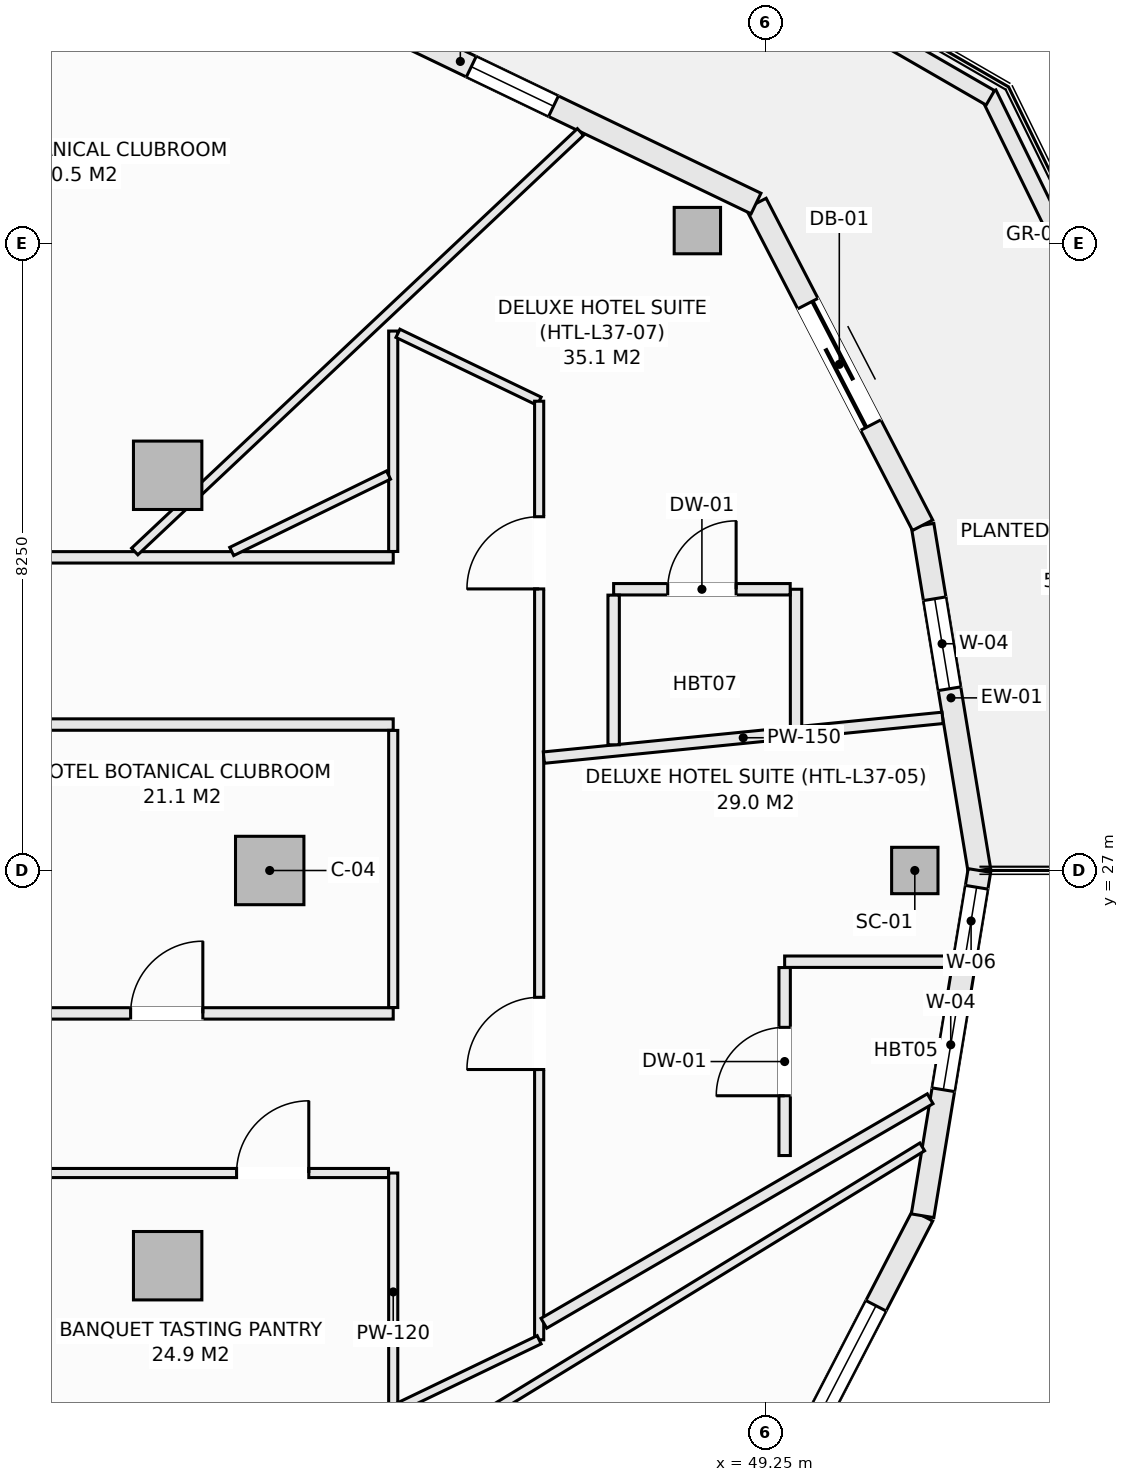
"""IFC4 building model, lengths in metres.
Left out: names, types, materials, properties, quantities, classifications, styles, units other than length and angle.
Written with IfcOpenShell. Run it as: python <this file> out.ifc"""

import sys

from ifc_helpers import new_model, si_unit, direction, frame, frame_2d, origin, origin_2d, place, context, subcontext, project, spatial, rectangle, hollow_rectangle, extrude, element, fill, save


model = new_model("IFC4")
c1 = context("Model", 3, precision=1e-05, world=origin(), true_north=direction((0.0, 1.0)))
c2 = subcontext(c1, "Body", "Model", "MODEL_VIEW")
j1 = project(units=[si_unit("LENGTHUNIT", "METRE"), si_unit("PLANEANGLEUNIT", "RADIAN")], contexts=[c1])
p1 = place(None, origin())
s1 = spatial("IfcSite", under=j1, at=p1, CompositionType="ELEMENT")
p2 = place(p1, origin())
s2 = spatial("IfcBuilding", under=s1, at=p2, CompositionType="ELEMENT")
p3 = place(p2, frame((0.0, 0.0, 146.1)))
s3 = spatial("IfcBuildingStorey", under=s2, at=p3, CompositionType="ELEMENT", Elevation=146.1)
for number, where, z_axis, x_axis in (
    (1, (51.212, 27.0, -0.27), (0.0, 0.0, 1.0), (1.0, 0.0, 0.0)),
    (2, (48.352, 35.419, -0.27), (0.0, 0.0, 1.0), (1.0, 0.0, 0.0)),
):
    element("IfcColumn", number, at=place(p3, frame(where, z_axis=z_axis, x_axis=x_axis)), inside=s3, PredefinedType="COLUMN", context=c2, shape_type="SweptSolid", body=[
        extrude(hollow_rectangle(XDim=0.61, YDim=0.61, WallThickness=0.025, at=origin_2d()), origin(), (0.0, 0.0, 1.0), 3.4),
    ])
for number, where, z_axis, x_axis in (
    (3, (42.725, 27.0, -0.27), (0.0, 0.0, 1.0), (1.0, 0.0, 0.0)),
    (4, (41.382, 32.199, -0.27), (0.0, 0.0, 1.0), (1.0, 0.0, 0.0)),
    (5, (41.382, 21.801, -0.27), (0.0, 0.0, 1.0), (1.0, 0.0, 0.0)),
):
    element("IfcColumn", number, at=place(p3, frame(where, z_axis=z_axis, x_axis=x_axis)), inside=s3, PredefinedType="COLUMN", context=c2, shape_type="SweptSolid", body=[
        extrude(rectangle(XDim=0.9, YDim=0.9, at=origin_2d()), origin(), (0.0, 0.0, 1.0), 3.4),
    ])
p4 = place(p3, frame((51.315, 31.542, 0.0), z_axis=(0.0, 0.0, 1.0), x_axis=(0.162394765401, -0.986725868806, 0.0)))
e6 = element("IfcWall", 6, at=p4, inside=s3, PredefinedType="SOLIDWALL", context=c2, shape_type="SweptSolid", body=[
    extrude(rectangle(XDim=4.603, YDim=0.3, at=frame_2d((2.302, 0.0))), origin(), (0.0, 0.0, 1.0), 2.653),
])
p5 = place(p4, frame((0.98, 0.0, 0.72)))
e7 = element("IfcOpeningElement", 7, at=p5, cuts=e6, PredefinedType="OPENING", context=c2, shape_type="SweptSolid", body=[
    extrude(rectangle(XDim=1.2, YDim=1.65, at=frame_2d((0.6, 0.825))), frame((0.0, 0.16, 0.0), z_axis=(0.0, -1.0, 0.0), x_axis=(1.0, 0.0, 0.0)), (0.0, 0.0, 1.0), 0.32),
])
p6 = place(p3, frame((49.123, 35.775, 0.0), z_axis=(0.0, 0.0, 1.0), x_axis=(0.459810251451, -0.888017191647, 0.0)))
e8 = element("IfcWall", 8, at=p6, inside=s3, PredefinedType="SOLIDWALL", context=c2, shape_type="SweptSolid", body=[
    extrude(rectangle(XDim=4.766, YDim=0.3, at=frame_2d((2.383, 0.0))), origin(), (0.0, 0.0, 1.0), 2.653),
])
p7 = place(p6, frame((1.483, 0.0, 0.0)))
e9 = element("IfcOpeningElement", 9, at=p7, cuts=e8, PredefinedType="OPENING", context=c2, shape_type="SweptSolid", body=[
    extrude(rectangle(XDim=1.8, YDim=2.25, at=frame_2d((0.9, 1.125))), frame((0.0, 0.16, 0.0), z_axis=(0.0, -1.0, 0.0), x_axis=(1.0, 0.0, 0.0)), (0.0, 0.0, 1.0), 0.32),
])
p8 = place(p3, frame((44.313, 38.086, 0.0), z_axis=(0.0, 0.0, 1.0), x_axis=(0.901353070301, -0.433085029363, 0.0)))
e10 = element("IfcWall", 10, at=p8, inside=s3, PredefinedType="SOLIDWALL", context=c2, shape_type="SweptSolid", body=[
    extrude(rectangle(XDim=5.336, YDim=0.3, at=frame_2d((2.668, 0.0))), origin(), (0.0, 0.0, 1.0), 2.653),
])
p9 = place(p8, frame((1.18, 0.0, 0.72)))
e11 = element("IfcOpeningElement", 11, at=p9, cuts=e10, PredefinedType="OPENING", context=c2, shape_type="SweptSolid", body=[
    extrude(rectangle(XDim=1.2, YDim=1.65, at=frame_2d((0.6, 0.825))), frame((0.0, 0.16, 0.0), z_axis=(0.0, -1.0, 0.0), x_axis=(1.0, 0.0, 0.0)), (0.0, 0.0, 1.0), 0.32),
])
p10 = place(p3, frame((49.123, 18.225, 0.0), z_axis=(0.0, 0.0, 1.0), x_axis=(0.459810251451, 0.888017191647, 0.0)))
e12 = element("IfcWall", 12, at=p10, inside=s3, PredefinedType="SOLIDWALL", context=c2, shape_type="SweptSolid", body=[
    extrude(rectangle(XDim=4.766, YDim=0.3, at=frame_2d((2.383, 0.0))), origin(), (0.0, 0.0, 1.0), 2.653),
])
p11 = place(p10, frame((1.333, 0.0, 0.74)))
e13 = element("IfcOpeningElement", 13, at=p11, cuts=e12, PredefinedType="OPENING", context=c2, shape_type="SweptSolid", body=[
    extrude(rectangle(XDim=2.1, YDim=1.7, at=frame_2d((1.05, 0.85))), frame((0.0, 0.16, 0.0), z_axis=(0.0, -1.0, 0.0), x_axis=(1.0, 0.0, 0.0)), (0.0, 0.0, 1.0), 0.32),
])
p12 = place(p3, frame((51.315, 22.458, 0.0), z_axis=(0.0, 0.0, 1.0), x_axis=(0.162394765401, 0.986725868806, 0.0)))
e14 = element("IfcWall", 14, at=p12, inside=s3, PredefinedType="SOLIDWALL", context=c2, shape_type="SweptSolid", body=[
    extrude(rectangle(XDim=4.603, YDim=0.3, at=frame_2d((2.302, 0.0))), origin(), (0.0, 0.0, 1.0), 2.653),
])
p13 = place(p12, frame((1.68, 0.0, 0.74)))
e15 = element("IfcOpeningElement", 15, at=p13, cuts=e14, PredefinedType="OPENING", context=c2, shape_type="SweptSolid", body=[
    extrude(rectangle(XDim=1.2, YDim=1.7, at=frame_2d((0.6, 0.85))), frame((0.0, 0.16, 0.0), z_axis=(0.0, -1.0, 0.0), x_axis=(1.0, 0.0, 0.0)), (0.0, 0.0, 1.0), 0.32),
])
p14 = place(p12, frame((3.48, 0.0, 0.72)))
e16 = element("IfcOpeningElement", 16, at=p14, cuts=e14, PredefinedType="OPENING", context=c2, shape_type="SweptSolid", body=[
    extrude(rectangle(XDim=0.9, YDim=1.65, at=frame_2d((0.45, 0.825))), frame((0.0, 0.16, 0.0), z_axis=(0.0, -1.0, 0.0), x_axis=(1.0, 0.0, 0.0)), (0.0, 0.0, 1.0), 0.32),
])
p15 = place(p3, frame((52.18, 37.221, 0.0), z_axis=(0.0, 0.0, 1.0), x_axis=(0.439637174641, -0.898175458735, 0.0)))
e17 = element("IfcWall", 17, at=p15, inside=s3, PredefinedType="PARAPET", context=c2, shape_type="SweptSolid", body=[
    extrude(rectangle(XDim=5.567, YDim=0.22, at=frame_2d((2.784, 0.0))), origin(), (0.0, 0.0, 1.0), 0.52),
])
p16 = place(p3, frame((46.958, 40.195, 0.0), z_axis=(0.0, 0.0, 1.0), x_axis=(0.866058128659, -0.499943314571, 0.0)))
e18 = element("IfcWall", 18, at=p16, inside=s3, PredefinedType="PARAPET", context=c2, shape_type="SweptSolid", body=[
    extrude(rectangle(XDim=6.06, YDim=0.22, at=frame_2d((3.03, 0.0))), origin(), (0.0, 0.0, 1.0), 0.52),
])
p17 = place(p3, frame((29.78, 25.12, 0.0), z_axis=(0.0, 0.0, 1.0), x_axis=(1.0, 0.0, 0.0)))
e19 = element("IfcWall", 19, at=p17, inside=s3, PredefinedType="PARTITIONING", context=c2, shape_type="SweptSolid", body=[
    extrude(rectangle(XDim=14.57, YDim=0.15, at=frame_2d((7.285, 0.0))), origin(), (0.0, 0.0, 1.0), 3.13),
])
p18 = place(p17, frame((3.14, 0.0, 0.0)))
e20 = element("IfcOpeningElement", 20, at=p18, cuts=e19, PredefinedType="OPENING", context=c2, shape_type="SweptSolid", body=[
    extrude(rectangle(XDim=0.95, YDim=2.1, at=frame_2d((0.475, 1.05))), frame((0.0, 0.085, 0.0), z_axis=(0.0, -1.0, 0.0), x_axis=(1.0, 0.0, 0.0)), (0.0, 0.0, 1.0), 0.17),
])
p19 = place(p17, frame((7.445, 0.0, 0.0)))
e21 = element("IfcOpeningElement", 21, at=p19, cuts=e19, PredefinedType="OPENING", context=c2, shape_type="SweptSolid", body=[
    extrude(rectangle(XDim=0.95, YDim=2.1, at=frame_2d((0.475, 1.05))), frame((0.0, 0.085, 0.0), z_axis=(0.0, -1.0, 0.0), x_axis=(1.0, 0.0, 0.0)), (0.0, 0.0, 1.0), 0.17),
])
p20 = place(p17, frame((11.115, 0.0, 0.0)))
e22 = element("IfcOpeningElement", 22, at=p20, cuts=e19, PredefinedType="OPENING", context=c2, shape_type="SweptSolid", body=[
    extrude(rectangle(XDim=0.95, YDim=2.1, at=frame_2d((0.475, 1.05))), frame((0.0, 0.085, 0.0), z_axis=(0.0, -1.0, 0.0), x_axis=(1.0, 0.0, 0.0)), (0.0, 0.0, 1.0), 0.17),
])
p21 = place(p3, frame((30.077, 28.92, 0.0), z_axis=(0.0, 0.0, 1.0), x_axis=(1.0, 0.0, 0.0)))
e23 = element("IfcWall", 23, at=p21, inside=s3, PredefinedType="PARTITIONING", context=c2, shape_type="SweptSolid", body=[
    extrude(rectangle(XDim=14.273, YDim=0.15, at=frame_2d((7.137, 0.0))), origin(), (0.0, 0.0, 1.0), 3.13),
])
p22 = place(p3, frame((38.862, 31.12, 0.0), z_axis=(0.0, 0.0, 1.0), x_axis=(1.0, 0.0, 0.0)))
e24 = element("IfcWall", 24, at=p22, inside=s3, PredefinedType="PARTITIONING", context=c2, shape_type="SweptSolid", body=[
    extrude(rectangle(XDim=5.488, YDim=0.15, at=frame_2d((2.744, 0.0))), origin(), (0.0, 0.0, 1.0), 3.13),
])
p23 = place(p3, frame((44.35, 19.891, 0.0), z_axis=(0.0, 0.0, 1.0), x_axis=(0.0, 1.0, 0.0)))
e25 = element("IfcWall", 25, at=p23, inside=s3, PredefinedType="PARTITIONING", context=c2, shape_type="SweptSolid", body=[
    extrude(rectangle(XDim=3.129, YDim=0.12, at=frame_2d((1.564, 0.0))), origin(), (0.0, 0.0, 1.0), 3.13),
])
p24 = place(p3, frame((44.35, 25.197, 0.0), z_axis=(0.0, 0.0, 1.0), x_axis=(0.0, 1.0, 0.0)))
e26 = element("IfcWall", 26, at=p24, inside=s3, PredefinedType="PARTITIONING", context=c2, shape_type="SweptSolid", body=[
    extrude(rectangle(XDim=3.646, YDim=0.12, at=frame_2d((1.823, 0.0))), origin(), (0.0, 0.0, 1.0), 3.13),
])
p25 = place(p3, frame((44.35, 31.197, 0.0), z_axis=(0.0, 0.0, 1.0), x_axis=(0.0, 1.0, 0.0)))
e27 = element("IfcWall", 27, at=p25, inside=s3, PredefinedType="PARTITIONING", context=c2, shape_type="SweptSolid", body=[
    extrude(rectangle(XDim=2.9, YDim=0.12, at=frame_2d((1.45, 0.0))), origin(), (0.0, 0.0, 1.0), 3.13),
])
p26 = place(p3, frame((44.412, 34.067, 0.0), z_axis=(0.0, 0.0, 1.0), x_axis=(0.90128266231, -0.433231534656, 0.0)))
e28 = element("IfcWall", 28, at=p26, inside=s3, PredefinedType="PARTITIONING", context=c2, shape_type="SweptSolid", body=[
    extrude(rectangle(XDim=2.062, YDim=0.12, at=frame_2d((1.031, 0.0))), origin(), (0.0, 0.0, 1.0), 3.13),
])
p27 = place(p3, frame((46.27, 20.826, 0.0), z_axis=(0.0, 0.0, 1.0), x_axis=(0.0, 1.0, 0.0)))
e29 = element("IfcWall", 29, at=p27, inside=s3, PredefinedType="PARTITIONING", context=c2, shape_type="SweptSolid", body=[
    extrude(rectangle(XDim=12.348, YDim=0.12, at=frame_2d((6.174, 0.0))), origin(), (0.0, 0.0, 1.0), 3.13),
])
p28 = place(p27, frame((3.556, 0.0, 0.0)))
e30 = element("IfcOpeningElement", 30, at=p28, cuts=e29, PredefinedType="OPENING", context=c2, shape_type="SweptSolid", body=[
    extrude(rectangle(XDim=0.95, YDim=2.1, at=frame_2d((0.475, 1.05))), frame((0.0, 0.07, 0.0), z_axis=(0.0, -1.0, 0.0), x_axis=(1.0, 0.0, 0.0)), (0.0, 0.0, 1.0), 0.14),
])
p29 = place(p27, frame((9.878, 0.0, 0.0)))
e31 = element("IfcOpeningElement", 31, at=p29, cuts=e29, PredefinedType="OPENING", context=c2, shape_type="SweptSolid", body=[
    extrude(rectangle(XDim=0.95, YDim=2.1, at=frame_2d((0.475, 1.05))), frame((0.0, 0.07, 0.0), z_axis=(0.0, -1.0, 0.0), x_axis=(1.0, 0.0, 0.0)), (0.0, 0.0, 1.0), 0.14),
])
p30 = place(p3, frame((44.412, 19.933, 0.0), z_axis=(0.0, 0.0, 1.0), x_axis=(0.90128266231, 0.433231534656, 0.0)))
e32 = element("IfcWall", 32, at=p30, inside=s3, PredefinedType="PARTITIONING", context=c2, shape_type="SweptSolid", body=[
    extrude(rectangle(XDim=2.062, YDim=0.12, at=frame_2d((1.031, 0.0))), origin(), (0.0, 0.0, 1.0), 3.13),
])
p31 = place(p3, frame((39.0, 23.02, 0.0), z_axis=(0.0, 0.0, 1.0), x_axis=(1.0, 0.0, 0.0)))
e33 = element("IfcWall", 33, at=p31, inside=s3, PredefinedType="PARTITIONING", context=c2, shape_type="SweptSolid", body=[
    extrude(rectangle(XDim=5.288, YDim=0.12, at=frame_2d((2.644, 0.0))), origin(), (0.0, 0.0, 1.0), 3.13),
])
p32 = place(p31, frame((3.289, 0.0, 0.0)))
e34 = element("IfcOpeningElement", 34, at=p32, cuts=e33, PredefinedType="OPENING", context=c2, shape_type="SweptSolid", body=[
    extrude(rectangle(XDim=0.95, YDim=2.1, at=frame_2d((0.475, 1.05))), frame((0.0, 0.07, 0.0), z_axis=(0.0, -1.0, 0.0), x_axis=(1.0, 0.0, 0.0)), (0.0, 0.0, 1.0), 0.14),
])
p33 = place(p3, frame((46.332, 28.485, 0.0), z_axis=(0.0, 0.0, 1.0), x_axis=(0.995067863433, 0.099196507817, 0.0)))
e35 = element("IfcWall", 35, at=p33, inside=s3, PredefinedType="PARTITIONING", context=c2, shape_type="SweptSolid", body=[
    extrude(rectangle(XDim=5.272, YDim=0.15, at=frame_2d((2.636, 0.0))), origin(), (0.0, 0.0, 1.0), 3.13),
])
p34 = place(p3, frame((39.082, 15.87, 0.0), z_axis=(0.0, 0.0, 1.0), x_axis=(0.852607858044, 0.522551280165, 0.0)))
e36 = element("IfcWall", 36, at=p34, inside=s3, PredefinedType="PARTITIONING", context=c2, shape_type="SweptSolid", body=[
    extrude(rectangle(XDim=14.342, YDim=0.12, at=frame_2d((7.171, 0.0))), origin(), (0.0, 0.0, 1.0), 2.505),
])
p35 = place(p3, frame((46.332, 21.043, 0.0), z_axis=(0.0, 0.0, 1.0), x_axis=(0.864559641837, 0.502530223674, 0.0)))
e37 = element("IfcWall", 37, at=p35, inside=s3, PredefinedType="PARTITIONING", context=c2, shape_type="SweptSolid", body=[
    extrude(rectangle(XDim=5.878, YDim=0.15, at=frame_2d((2.939, 0.0))), origin(), (0.0, 0.0, 1.0), 3.13),
])
p36 = place(p3, frame((49.5, 25.8, 0.0), z_axis=(0.0, 0.0, 1.0), x_axis=(1.0, 0.0, 0.0)))
e38 = element("IfcWall", 38, at=p36, inside=s3, PredefinedType="PARTITIONING", context=c2, shape_type="SweptSolid", body=[
    extrude(rectangle(XDim=2.211, YDim=0.15, at=frame_2d((1.105, 0.0))), origin(), (0.0, 0.0, 1.0), 3.13),
])
p37 = place(p3, frame((49.5, 23.25, 0.0), z_axis=(0.0, 0.0, 1.0), x_axis=(0.0, 1.0, 0.0)))
e39 = element("IfcWall", 39, at=p37, inside=s3, PredefinedType="PARTITIONING", context=c2, shape_type="SweptSolid", body=[
    extrude(rectangle(XDim=2.473, YDim=0.15, at=frame_2d((1.236, 0.0))), origin(), (0.0, 0.0, 1.0), 3.13),
])
p38 = place(p37, frame((0.787, 0.0, 0.0)))
e40 = element("IfcOpeningElement", 40, at=p38, cuts=e39, PredefinedType="OPENING", context=c2, shape_type="SweptSolid", body=[
    extrude(rectangle(XDim=0.9, YDim=2.1, at=frame_2d((0.45, 1.05))), frame((0.0, 0.085, 0.0), z_axis=(0.0, -1.0, 0.0), x_axis=(1.0, 0.0, 0.0)), (0.0, 0.0, 1.0), 0.17),
])
p39 = place(p3, frame((49.65, 28.893, 0.0), z_axis=(0.0, 0.0, 1.0), x_axis=(0.0, 1.0, 0.0)))
e41 = element("IfcWall", 41, at=p39, inside=s3, PredefinedType="PARTITIONING", context=c2, shape_type="SweptSolid", body=[
    extrude(rectangle(XDim=1.807, YDim=0.15, at=frame_2d((0.903, 0.0))), origin(), (0.0, 0.0, 1.0), 3.13),
])
p40 = place(p3, frame((47.25, 30.7, 0.0), z_axis=(0.0, 0.0, 1.0), x_axis=(1.0, 0.0, 0.0)))
e42 = element("IfcWall", 42, at=p40, inside=s3, PredefinedType="PARTITIONING", context=c2, shape_type="SweptSolid", body=[
    extrude(rectangle(XDim=2.323, YDim=0.15, at=frame_2d((1.162, 0.0))), origin(), (0.0, 0.0, 1.0), 3.13),
])
p41 = place(p40, frame((0.711, 0.0, 0.0)))
e43 = element("IfcOpeningElement", 43, at=p41, cuts=e42, PredefinedType="OPENING", context=c2, shape_type="SweptSolid", body=[
    extrude(rectangle(XDim=0.9, YDim=2.1, at=frame_2d((0.45, 1.05))), frame((0.0, 0.085, 0.0), z_axis=(0.0, -1.0, 0.0), x_axis=(1.0, 0.0, 0.0)), (0.0, 0.0, 1.0), 0.17),
])
p42 = place(p3, frame((47.25, 28.654, 0.0), z_axis=(0.0, 0.0, 1.0), x_axis=(0.0, 1.0, 0.0)))
e44 = element("IfcWall", 44, at=p42, inside=s3, PredefinedType="PARTITIONING", context=c2, shape_type="SweptSolid", body=[
    extrude(rectangle(XDim=1.969, YDim=0.15, at=frame_2d((0.984, 0.0))), origin(), (0.0, 0.0, 1.0), 3.13),
])
p43 = place(p3, frame((42.225, 31.197, 0.0), z_axis=(0.0, 0.0, 1.0), x_axis=(0.898870643835, 0.438214063732, 0.0)))
e45 = element("IfcWall", 45, at=p43, inside=s3, PredefinedType="PARTITIONING", context=c2, shape_type="SweptSolid", body=[
    extrude(rectangle(XDim=2.295, YDim=0.12, at=frame_2d((1.148, 0.0))), origin(), (0.0, 0.0, 1.0), 3.13),
])
p44 = place(p3, frame((40.949, 31.197, 0.0), z_axis=(0.0, 0.0, 1.0), x_axis=(0.728258728927, 0.685302286397, 0.0)))
e46 = element("IfcWall", 46, at=p44, inside=s3, PredefinedType="PARTITIONING", context=c2, shape_type="SweptSolid", body=[
    extrude(rectangle(XDim=8.053, YDim=0.12, at=frame_2d((4.027, 0.0))), origin(), (0.0, 0.0, 1.0), 2.812),
])
p45 = place(p3, frame((34.112, 36.482, 0.0), z_axis=(0.0, 0.0, 1.0), x_axis=(0.92763911586, 0.373477804863, 0.0)))
e47 = element("IfcWall", 47, at=p45, inside=s3, PredefinedType="PARTITIONING", context=c2, shape_type="SweptSolid", body=[
    extrude(rectangle(XDim=9.233, YDim=0.12, at=frame_2d((4.616, 0.0))), origin(), (0.0, 0.0, 1.0), 2.505),
])
p46 = place(p5, origin())
e48 = element("IfcWindow", 48, at=p46, inside=s3, PartitioningType="SINGLE_PANEL", PredefinedType="WINDOW", context=c2, shape_type="SweptSolid", body=[
    extrude(rectangle(XDim=1.2, YDim=1.65, at=frame_2d((0.6, 0.825))), frame((0.0, 0.03, 0.0), z_axis=(0.0, -1.0, 0.0), x_axis=(1.0, 0.0, 0.0)), (0.0, 0.0, 1.0), 0.06),
])
fill(e7, e48)
p47 = place(p7, origin())
e49 = element("IfcDoor", 49, at=p47, inside=s3, OperationType="SLIDING_TO_LEFT", PredefinedType="DOOR", context=c2, shape_type="SweptSolid", body=[
    extrude(rectangle(XDim=1.8, YDim=2.25, at=frame_2d((0.9, 1.125))), frame((0.0, 0.025, 0.0), z_axis=(0.0, -1.0, 0.0), x_axis=(1.0, 0.0, 0.0)), (0.0, 0.0, 1.0), 0.05),
])
fill(e9, e49)
p48 = place(p9, origin())
e50 = element("IfcWindow", 50, at=p48, inside=s3, PartitioningType="SINGLE_PANEL", PredefinedType="WINDOW", context=c2, shape_type="SweptSolid", body=[
    extrude(rectangle(XDim=1.2, YDim=1.65, at=frame_2d((0.6, 0.825))), frame((0.0, 0.03, 0.0), z_axis=(0.0, -1.0, 0.0), x_axis=(1.0, 0.0, 0.0)), (0.0, 0.0, 1.0), 0.06),
])
fill(e11, e50)
p49 = place(p11, origin())
e51 = element("IfcWindow", 51, at=p49, inside=s3, PartitioningType="SINGLE_PANEL", PredefinedType="WINDOW", context=c2, shape_type="SweptSolid", body=[
    extrude(rectangle(XDim=2.1, YDim=1.7, at=frame_2d((1.05, 0.85))), frame((0.0, 0.03, 0.0), z_axis=(0.0, -1.0, 0.0), x_axis=(1.0, 0.0, 0.0)), (0.0, 0.0, 1.0), 0.06),
])
fill(e13, e51)
p50 = place(p13, origin())
e52 = element("IfcWindow", 52, at=p50, inside=s3, PartitioningType="SINGLE_PANEL", PredefinedType="WINDOW", context=c2, shape_type="SweptSolid", body=[
    extrude(rectangle(XDim=1.2, YDim=1.7, at=frame_2d((0.6, 0.85))), frame((0.0, 0.03, 0.0), z_axis=(0.0, -1.0, 0.0), x_axis=(1.0, 0.0, 0.0)), (0.0, 0.0, 1.0), 0.06),
])
fill(e15, e52)
p51 = place(p32, origin())
e53 = element("IfcDoor", 53, at=p51, inside=s3, OperationType="SINGLE_SWING_RIGHT", PredefinedType="DOOR", context=c2, shape_type="SweptSolid", body=[
    extrude(rectangle(XDim=0.95, YDim=2.1, at=frame_2d((0.475, 1.05))), frame((0.0, 0.025, 0.0), z_axis=(0.0, -1.0, 0.0), x_axis=(1.0, 0.0, 0.0)), (0.0, 0.0, 1.0), 0.05),
])
fill(e34, e53)
p52 = place(p28, origin())
e54 = element("IfcDoor", 54, at=p52, inside=s3, OperationType="SINGLE_SWING_LEFT", PredefinedType="DOOR", context=c2, shape_type="SweptSolid", body=[
    extrude(rectangle(XDim=0.95, YDim=2.1, at=frame_2d((0.475, 1.05))), frame((0.0, 0.025, 0.0), z_axis=(0.0, -1.0, 0.0), x_axis=(1.0, 0.0, 0.0)), (0.0, 0.0, 1.0), 0.05),
])
fill(e30, e54)
p53 = place(p20, origin())
e55 = element("IfcDoor", 55, at=p53, inside=s3, OperationType="SINGLE_SWING_RIGHT", PredefinedType="DOOR", context=c2, shape_type="SweptSolid", body=[
    extrude(rectangle(XDim=0.95, YDim=2.1, at=frame_2d((0.475, 1.05))), frame((0.0, 0.025, 0.0), z_axis=(0.0, -1.0, 0.0), x_axis=(1.0, 0.0, 0.0)), (0.0, 0.0, 1.0), 0.05),
])
fill(e22, e55)
p54 = place(p29, origin())
e56 = element("IfcDoor", 56, at=p54, inside=s3, OperationType="SINGLE_SWING_LEFT", PredefinedType="DOOR", context=c2, shape_type="SweptSolid", body=[
    extrude(rectangle(XDim=0.95, YDim=2.1, at=frame_2d((0.475, 1.05))), frame((0.0, 0.025, 0.0), z_axis=(0.0, -1.0, 0.0), x_axis=(1.0, 0.0, 0.0)), (0.0, 0.0, 1.0), 0.05),
])
fill(e31, e56)
p55 = place(p38, origin())
e57 = element("IfcDoor", 57, at=p55, inside=s3, OperationType="SINGLE_SWING_LEFT", PredefinedType="DOOR", context=c2, shape_type="SweptSolid", body=[
    extrude(rectangle(XDim=0.9, YDim=2.1, at=frame_2d((0.45, 1.05))), frame((0.0, 0.025, 0.0), z_axis=(0.0, -1.0, 0.0), x_axis=(1.0, 0.0, 0.0)), (0.0, 0.0, 1.0), 0.05),
])
fill(e40, e57)
p56 = place(p41, origin())
e58 = element("IfcDoor", 58, at=p56, inside=s3, OperationType="SINGLE_SWING_RIGHT", PredefinedType="DOOR", context=c2, shape_type="SweptSolid", body=[
    extrude(rectangle(XDim=0.9, YDim=2.1, at=frame_2d((0.45, 1.05))), frame((0.0, 0.025, 0.0), z_axis=(0.0, -1.0, 0.0), x_axis=(1.0, 0.0, 0.0)), (0.0, 0.0, 1.0), 0.05),
])
fill(e43, e58)
p57 = place(p14, origin())
e59 = element("IfcWindow", 59, at=p57, inside=s3, PartitioningType="SINGLE_PANEL", PredefinedType="WINDOW", context=c2, shape_type="SweptSolid", body=[
    extrude(rectangle(XDim=0.9, YDim=1.65, at=frame_2d((0.45, 0.825))), frame((0.0, 0.03, 0.0), z_axis=(0.0, -1.0, 0.0), x_axis=(1.0, 0.0, 0.0)), (0.0, 0.0, 1.0), 0.06),
])
fill(e16, e59)
save(model, sys.argv[1])
